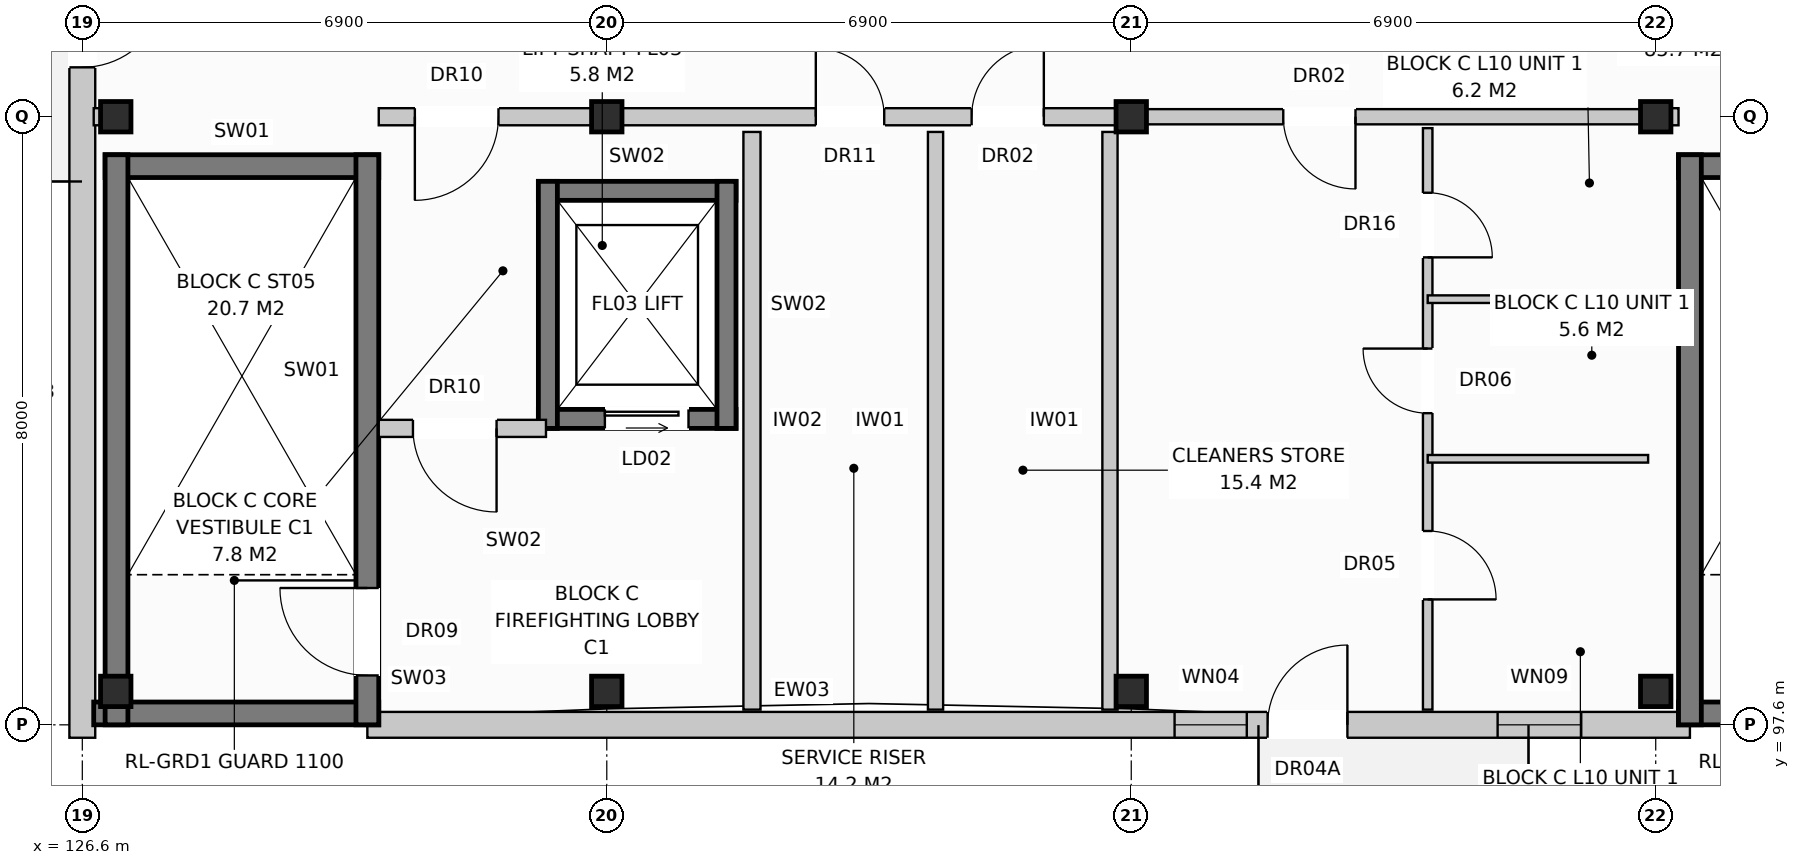
"""IFC4 building model, lengths in metres.
Left out: names, types, materials, properties, quantities, classifications, styles, units other than length and angle.
Written with IfcOpenShell. Run it as: python <this file> out.ifc"""

import sys

from ifc_helpers import new_model, si_unit, direction, frame, frame_2d, origin, origin_with_axes, origin_2d, place, context, subcontext, project, spatial, rectangle, extrude, element, fill, save


model = new_model("IFC4")
c1 = context("Model", 3, precision=1e-05, world=origin(), true_north=direction((0.0, 1.0)))
c2 = subcontext(c1, "Body", "Model", "MODEL_VIEW")
j1 = project(units=[si_unit("LENGTHUNIT", "METRE"), si_unit("PLANEANGLEUNIT", "RADIAN")], contexts=[c1])
p1 = place(None, origin())
s1 = spatial("IfcSite", under=j1, at=p1, CompositionType="ELEMENT")
p2 = place(p1, origin())
s2 = spatial("IfcBuilding", under=s1, at=p2, CompositionType="ELEMENT")
p3 = place(p2, frame((0.0, 0.0, 33.6)))
s3 = spatial("IfcBuildingStorey", under=s2, at=p3, CompositionType="ELEMENT", Elevation=33.6)
for number, where, z_axis, x_axis in (
    (1, (127.04, 98.04, 0.0), (0.0, 0.0, 1.0), (1.0, 0.0, 0.0)),
    (2, (127.04, 105.6, 0.0), (0.0, 0.0, 1.0), (1.0, 0.0, 0.0)),
    (3, (133.5, 98.04, 0.0), (0.0, 0.0, 1.0), (1.0, 0.0, 0.0)),
    (4, (133.5, 105.6, 0.0), (0.0, 0.0, 1.0), (1.0, 0.0, 0.0)),
    (5, (140.4, 98.04, 0.0), (0.0, 0.0, 1.0), (1.0, 0.0, 0.0)),
    (6, (140.4, 105.6, 0.0), (0.0, 0.0, 1.0), (1.0, 0.0, 0.0)),
    (7, (147.3, 98.04, 0.0), (0.0, 0.0, 1.0), (1.0, 0.0, 0.0)),
    (8, (147.3, 105.6, 0.0), (0.0, 0.0, 1.0), (1.0, 0.0, 0.0)),
):
    element("IfcColumn", number, at=place(p3, frame(where, z_axis=z_axis, x_axis=x_axis)), inside=s3, PredefinedType="COLUMN", context=c2, shape_type="SweptSolid", body=[
        extrude(rectangle(XDim=0.4, YDim=0.4, at=origin_2d()), origin(), (0.0, 0.0, 1.0), 3.2),
    ])
p4 = place(p3, frame((130.35, 97.6, 0.0), z_axis=(0.0, 0.0, 1.0), x_axis=(1.0, 0.0, 0.0)))
e9 = element("IfcWall", 9, at=p4, inside=s3, PredefinedType="STANDARD", context=c2, shape_type="SweptSolid", body=[
    extrude(rectangle(XDim=17.4, YDim=0.34, at=frame_2d((8.7, 0.0))), origin(), (0.0, 0.0, 1.0), 2.91),
])
p5 = place(p4, frame((11.844, 0.0, 0.0)))
e10 = element("IfcOpeningElement", 10, at=p5, cuts=e9, PredefinedType="OPENING", context=c2, shape_type="SweptSolid", body=[
    extrude(rectangle(XDim=1.05, YDim=2.12, at=frame_2d((0.525, 1.06))), frame((0.0, 0.182, 0.0), z_axis=(0.0, -1.0, 0.0), x_axis=(1.0, 0.0, 0.0)), (0.0, 0.0, 1.0), 0.364),
])
p6 = place(p4, frame((10.62, 0.0, 0.9)))
e11 = element("IfcOpeningElement", 11, at=p6, cuts=e9, PredefinedType="OPENING", context=c2, shape_type="SweptSolid", body=[
    extrude(rectangle(XDim=0.95, YDim=1.55, at=frame_2d((0.475, 0.775))), frame((0.0, 0.182, 0.0), z_axis=(0.0, -1.0, 0.0), x_axis=(1.0, 0.0, 0.0)), (0.0, 0.0, 1.0), 0.364),
])
p7 = place(p4, frame((14.87, 0.0, 0.72)))
e12 = element("IfcOpeningElement", 12, at=p7, cuts=e9, PredefinedType="OPENING", context=c2, shape_type="SweptSolid", body=[
    extrude(rectangle(XDim=1.1, YDim=1.5, at=frame_2d((0.55, 0.75))), frame((0.0, 0.182, 0.0), z_axis=(0.0, -1.0, 0.0), x_axis=(1.0, 0.0, 0.0)), (0.0, 0.0, 1.0), 0.364),
])
p8 = place(p3, frame((126.6, 97.43, 0.0), z_axis=(0.0, 0.0, 1.0), x_axis=(0.0, 1.0, 0.0)))
e13 = element("IfcWall", 13, at=p8, inside=s3, PredefinedType="STANDARD", context=c2, shape_type="SweptSolid", body=[
    extrude(rectangle(XDim=18.74, YDim=0.34, at=frame_2d((9.37, 0.0))), origin(), (0.0, 0.0, 1.0), 2.91),
])
p9 = place(p8, frame((8.82, 0.0, 0.0)))
e14 = element("IfcOpeningElement", 14, at=p9, cuts=e13, PredefinedType="OPENING", context=c2, shape_type="SweptSolid", body=[
    extrude(rectangle(XDim=1.1, YDim=2.1, at=frame_2d((0.55, 1.05))), frame((0.0, 0.182, 0.0), z_axis=(0.0, -1.0, 0.0), x_axis=(1.0, 0.0, 0.0)), (0.0, 0.0, 1.0), 0.364),
])
p10 = place(p8, frame((15.92, 0.0, 0.72)))
e15 = element("IfcOpeningElement", 15, at=p10, cuts=e13, PredefinedType="OPENING", context=c2, shape_type="SweptSolid", body=[
    extrude(rectangle(XDim=1.1, YDim=1.5, at=frame_2d((0.55, 0.75))), frame((0.0, 0.182, 0.0), z_axis=(0.0, -1.0, 0.0), x_axis=(1.0, 0.0, 0.0)), (0.0, 0.0, 1.0), 0.364),
])
p11 = place(p3, frame((126.75, 97.75, 0.0), z_axis=(0.0, 0.0, 1.0), x_axis=(1.0, 0.0, 0.0)))
e16 = element("IfcWall", 16, at=p11, inside=s3, PredefinedType="SHEAR", context=c2, shape_type="SweptSolid", body=[
    extrude(rectangle(XDim=3.75, YDim=0.3, at=frame_2d((1.875, 0.0))), origin(), (0.0, 0.0, 1.0), 2.96),
])
p12 = place(p3, frame((126.9, 104.95, 0.0), z_axis=(0.0, 0.0, 1.0), x_axis=(1.0, 0.0, 0.0)))
e17 = element("IfcWall", 17, at=p12, inside=s3, PredefinedType="SHEAR", context=c2, shape_type="SweptSolid", body=[
    extrude(rectangle(XDim=3.6, YDim=0.3, at=frame_2d((1.8, 0.0))), origin(), (0.0, 0.0, 1.0), 2.96),
])
p13 = place(p3, frame((127.05, 97.6, 0.0), z_axis=(0.0, 0.0, 1.0), x_axis=(0.0, 1.0, 0.0)))
e18 = element("IfcWall", 18, at=p13, inside=s3, PredefinedType="SHEAR", context=c2, shape_type="SweptSolid", body=[
    extrude(rectangle(XDim=7.5, YDim=0.3, at=frame_2d((3.75, 0.0))), origin(), (0.0, 0.0, 1.0), 2.96),
])
p14 = place(p3, frame((130.35, 97.6, 0.0), z_axis=(0.0, 0.0, 1.0), x_axis=(0.0, 1.0, 0.0)))
e19 = element("IfcWall", 19, at=p14, inside=s3, PredefinedType="SHEAR", context=c2, shape_type="SweptSolid", body=[
    extrude(rectangle(XDim=7.5, YDim=0.3, at=frame_2d((3.75, 0.0))), origin(), (0.0, 0.0, 1.0), 2.96),
])
p15 = place(p14, frame((0.65, 0.0, 0.0)))
e20 = element("IfcOpeningElement", 20, at=p15, cuts=e19, PredefinedType="OPENING", context=c2, shape_type="SweptSolid", body=[
    extrude(rectangle(XDim=1.15, YDim=2.15, at=frame_2d((0.575, 1.075))), frame((0.0, 0.162, 0.0), z_axis=(0.0, -1.0, 0.0), x_axis=(1.0, 0.0, 0.0)), (0.0, 0.0, 1.0), 0.324),
])
p16 = place(p3, frame((132.6, 101.625, 0.0), z_axis=(0.0, 0.0, 1.0), x_axis=(1.0, 0.0, 0.0)))
e21 = element("IfcWall", 21, at=p16, inside=s3, PredefinedType="SHEAR", context=c2, shape_type="SweptSolid", body=[
    extrude(rectangle(XDim=2.6, YDim=0.25, at=frame_2d((1.3, 0.0))), origin(), (0.0, 0.0, 1.0), 2.96),
])
p17 = place(p16, frame((0.875, 0.0, 0.0)))
e22 = element("IfcOpeningElement", 22, at=p17, cuts=e21, PredefinedType="OPENING", context=c2, shape_type="SweptSolid", body=[
    extrude(rectangle(XDim=1.1, YDim=2.1, at=frame_2d((0.55, 1.05))), frame((0.0, 0.137, 0.0), z_axis=(0.0, -1.0, 0.0), x_axis=(1.0, 0.0, 0.0)), (0.0, 0.0, 1.0), 0.274),
])
p18 = place(p3, frame((132.6, 104.625, 0.0), z_axis=(0.0, 0.0, 1.0), x_axis=(1.0, 0.0, 0.0)))
e23 = element("IfcWall", 23, at=p18, inside=s3, PredefinedType="SHEAR", context=c2, shape_type="SweptSolid", body=[
    extrude(rectangle(XDim=2.6, YDim=0.25, at=frame_2d((1.3, 0.0))), origin(), (0.0, 0.0, 1.0), 2.96),
])
for number, where, z_axis, x_axis in (
    (24, (132.725, 101.5, 0.0), (0.0, 0.0, 1.0), (0.0, 1.0, 0.0)),
    (25, (135.075, 101.5, 0.0), (0.0, 0.0, 1.0), (0.0, 1.0, 0.0)),
):
    element("IfcWall", number, at=place(p3, frame(where, z_axis=z_axis, x_axis=x_axis)), inside=s3, PredefinedType="SHEAR", context=c2, shape_type="SweptSolid", body=[
        extrude(rectangle(XDim=3.25, YDim=0.25, at=frame_2d((1.625, 0.0))), origin(), (0.0, 0.0, 1.0), 2.96),
    ])
p19 = place(p3, frame((135.41, 97.8, 0.0), z_axis=(0.0, 0.0, 1.0), x_axis=(0.0, 1.0, 0.0)))
e26 = element("IfcWall", 26, at=p19, inside=s3, PredefinedType="PARTITIONING", context=c2, shape_type="SweptSolid", body=[
    extrude(rectangle(XDim=7.6, YDim=0.225, at=frame_2d((3.8, 0.0))), origin(), (0.0, 0.0, 1.0), 2.59),
])
p20 = place(p3, frame((130.5, 101.5, 0.0), z_axis=(0.0, 0.0, 1.0), x_axis=(1.0, 0.0, 0.0)))
e27 = element("IfcWall", 27, at=p20, inside=s3, PredefinedType="PARTITIONING", context=c2, shape_type="SweptSolid", body=[
    extrude(rectangle(XDim=2.2, YDim=0.225, at=frame_2d((1.1, 0.0))), origin(), (0.0, 0.0, 1.0), 2.96),
])
p21 = place(p20, frame((0.45, 0.0, 0.0)))
e28 = element("IfcOpeningElement", 28, at=p21, cuts=e27, PredefinedType="OPENING", context=c2, shape_type="SweptSolid", body=[
    extrude(rectangle(XDim=1.1, YDim=2.15, at=frame_2d((0.55, 1.075))), frame((0.0, 0.125, 0.0), z_axis=(0.0, -1.0, 0.0), x_axis=(1.0, 0.0, 0.0)), (0.0, 0.0, 1.0), 0.249),
])
p22 = place(p3, frame((126.75, 105.6, 0.0), z_axis=(0.0, 0.0, 1.0), x_axis=(1.0, 0.0, 0.0)))
e29 = element("IfcWall", 29, at=p22, inside=s3, PredefinedType="PARTITIONING", context=c2, shape_type="SweptSolid", body=[
    extrude(rectangle(XDim=0.15, YDim=0.225, at=frame_2d((0.075, 0.0))), origin(), (0.0, 0.0, 1.0), 2.96),
])
for number, where, z_axis, x_axis in (
    (30, (137.825, 97.8, 0.0), (0.0, 0.0, 1.0), (0.0, 1.0, 0.0)),
    (31, (140.12, 97.8, 0.0), (0.0, 0.0, 1.0), (0.0, 1.0, 0.0)),
):
    element("IfcWall", number, at=place(p3, frame(where, z_axis=z_axis, x_axis=x_axis)), inside=s3, PredefinedType="PARTITIONING", context=c2, shape_type="SweptSolid", body=[
        extrude(rectangle(XDim=7.6, YDim=0.2, at=frame_2d((3.8, 0.0))), origin(), (0.0, 0.0, 1.0), 2.96),
    ])
p23 = place(p3, frame((130.5, 105.6, 0.0), z_axis=(0.0, 0.0, 1.0), x_axis=(1.0, 0.0, 0.0)))
e32 = element("IfcWall", 32, at=p23, inside=s3, PredefinedType="PARTITIONING", context=c2, shape_type="SweptSolid", body=[
    extrude(rectangle(XDim=9.9, YDim=0.225, at=frame_2d((4.95, 0.0))), origin(), (0.0, 0.0, 1.0), 2.35),
])
p24 = place(p23, frame((0.475, 0.0, 0.0)))
e33 = element("IfcOpeningElement", 33, at=p24, cuts=e32, PredefinedType="OPENING", context=c2, shape_type="SweptSolid", body=[
    extrude(rectangle(XDim=1.1, YDim=2.15, at=frame_2d((0.55, 1.075))), frame((0.0, 0.125, 0.0), z_axis=(0.0, -1.0, 0.0), x_axis=(1.0, 0.0, 0.0)), (0.0, 0.0, 1.0), 0.249),
])
p25 = place(p23, frame((5.75, 0.0, 0.0)))
e34 = element("IfcOpeningElement", 34, at=p25, cuts=e32, PredefinedType="OPENING", context=c2, shape_type="SweptSolid", body=[
    extrude(rectangle(XDim=0.9, YDim=2.1, at=frame_2d((0.45, 1.05))), frame((0.0, 0.125, 0.0), z_axis=(0.0, -1.0, 0.0), x_axis=(1.0, 0.0, 0.0)), (0.0, 0.0, 1.0), 0.249),
])
p26 = place(p23, frame((7.8, 0.0, 0.0)))
e35 = element("IfcOpeningElement", 35, at=p26, cuts=e32, PredefinedType="OPENING", context=c2, shape_type="SweptSolid", body=[
    extrude(rectangle(XDim=0.95, YDim=2.15, at=frame_2d((0.475, 1.075))), frame((0.0, 0.125, 0.0), z_axis=(0.0, -1.0, 0.0), x_axis=(1.0, 0.0, 0.0)), (0.0, 0.0, 1.0), 0.249),
])
for number, where, z_axis, x_axis in (
    (36, (147.6, 97.75, 0.0), (0.0, 0.0, 1.0), (1.0, 0.0, 0.0)),
    (37, (147.6, 104.95, 0.0), (0.0, 0.0, 1.0), (1.0, 0.0, 0.0)),
):
    element("IfcWall", number, at=place(p3, frame(where, z_axis=z_axis, x_axis=x_axis)), inside=s3, PredefinedType="SHEAR", context=c2, shape_type="SweptSolid", body=[
        extrude(rectangle(XDim=3.6, YDim=0.3, at=frame_2d((1.8, 0.0))), origin(), (0.0, 0.0, 1.0), 2.96),
    ])
p27 = place(p3, frame((147.75, 97.6, 0.0), z_axis=(0.0, 0.0, 1.0), x_axis=(0.0, 1.0, 0.0)))
e38 = element("IfcWall", 38, at=p27, inside=s3, PredefinedType="SHEAR", context=c2, shape_type="SweptSolid", body=[
    extrude(rectangle(XDim=7.5, YDim=0.3, at=frame_2d((3.75, 0.0))), origin(), (0.0, 0.0, 1.0), 2.96),
])
p28 = place(p3, frame((147.3, 105.6, 0.0), z_axis=(0.0, 0.0, 1.0), x_axis=(1.0, 0.0, 0.0)))
e39 = element("IfcWall", 39, at=p28, inside=s3, PredefinedType="PARTITIONING", context=c2, shape_type="SweptSolid", body=[
    extrude(rectangle(XDim=0.3, YDim=0.225, at=frame_2d((0.15, 0.0))), origin(), (0.0, 0.0, 1.0), 2.96),
])
p29 = place(p3, frame((140.4, 105.6, 0.0), z_axis=(0.0, 0.0, 1.0), x_axis=(1.0, 0.0, 0.0)))
e40 = element("IfcWall", 40, at=p29, inside=s3, PredefinedType="PARTITIONING", context=c2, shape_type="SweptSolid", body=[
    extrude(rectangle(XDim=6.9, YDim=0.2, at=frame_2d((3.45, 0.0))), origin(), (0.0, 0.0, 1.0), 2.35),
])
p30 = place(p29, frame((2.0, 0.0, 0.0)))
e41 = element("IfcOpeningElement", 41, at=p30, cuts=e40, PredefinedType="OPENING", context=c2, shape_type="SweptSolid", body=[
    extrude(rectangle(XDim=0.95, YDim=2.15, at=frame_2d((0.475, 1.075))), frame((0.0, 0.112, 0.0), z_axis=(0.0, -1.0, 0.0), x_axis=(1.0, 0.0, 0.0)), (0.0, 0.0, 1.0), 0.224),
])
p31 = place(p3, frame((144.3, 105.45, 0.0), z_axis=(0.0, 0.0, 1.0), x_axis=(0.0, -1.0, 0.0)))
e42 = element("IfcWall", 42, at=p31, inside=s3, PredefinedType="PARTITIONING", context=c2, shape_type="SweptSolid", body=[
    extrude(rectangle(XDim=7.65, YDim=0.125, at=frame_2d((3.825, 0.0))), origin(), (0.0, 0.0, 1.0), 2.96),
])
p32 = place(p31, frame((0.85, 0.0, 0.0)))
e43 = element("IfcOpeningElement", 43, at=p32, cuts=e42, PredefinedType="OPENING", context=c2, shape_type="SweptSolid", body=[
    extrude(rectangle(XDim=0.85, YDim=2.1, at=frame_2d((0.425, 1.05))), frame((0.0, 0.074, 0.0), z_axis=(0.0, -1.0, 0.0), x_axis=(1.0, 0.0, 0.0)), (0.0, 0.0, 1.0), 0.149),
])
p33 = place(p31, frame((2.9, 0.0, 0.0)))
e44 = element("IfcOpeningElement", 44, at=p33, cuts=e42, PredefinedType="OPENING", context=c2, shape_type="SweptSolid", body=[
    extrude(rectangle(XDim=0.85, YDim=2.05, at=frame_2d((0.425, 1.025))), frame((0.0, 0.074, 0.0), z_axis=(0.0, -1.0, 0.0), x_axis=(1.0, 0.0, 0.0)), (0.0, 0.0, 1.0), 0.149),
])
p34 = place(p31, frame((5.3, 0.0, 0.0)))
e45 = element("IfcOpeningElement", 45, at=p34, cuts=e42, PredefinedType="OPENING", context=c2, shape_type="SweptSolid", body=[
    extrude(rectangle(XDim=0.9, YDim=2.1, at=frame_2d((0.45, 1.05))), frame((0.0, 0.074, 0.0), z_axis=(0.0, -1.0, 0.0), x_axis=(1.0, 0.0, 0.0)), (0.0, 0.0, 1.0), 0.149),
])
for number, where, z_axis, x_axis in (
    (46, (144.3, 103.2, 0.0), (0.0, 0.0, 1.0), (1.0, 0.0, 0.0)),
    (47, (144.3, 101.1, 0.0), (0.0, 0.0, 1.0), (1.0, 0.0, 0.0)),
):
    element("IfcWall", number, at=place(p3, frame(where, z_axis=z_axis, x_axis=x_axis)), inside=s3, PredefinedType="PARTITIONING", context=c2, shape_type="SweptSolid", body=[
        extrude(rectangle(XDim=2.9, YDim=0.1, at=frame_2d((1.45, 0.0))), origin(), (0.0, 0.0, 1.0), 2.96),
    ])
p35 = place(p5, origin_with_axes())
e48 = element("IfcDoor", 48, at=p35, inside=s3, OperationType="SINGLE_SWING_RIGHT", PredefinedType="DOOR", context=c2, shape_type="SweptSolid", body=[
    extrude(rectangle(XDim=1.05, YDim=2.12, at=frame_2d((0.525, 1.06))), frame((0.0, 0.025, 0.0), z_axis=(0.0, -1.0, 0.0), x_axis=(1.0, 0.0, 0.0)), (0.0, 0.0, 1.0), 0.05),
])
fill(e10, e48)
p36 = place(p6, origin_with_axes())
e49 = element("IfcWindow", 49, at=p36, inside=s3, PartitioningType="SINGLE_PANEL", PredefinedType="WINDOW", context=c2, shape_type="SweptSolid", body=[
    extrude(rectangle(XDim=0.95, YDim=1.55, at=frame_2d((0.475, 0.775))), frame((0.0, 0.03, 0.0), z_axis=(0.0, -1.0, 0.0), x_axis=(1.0, 0.0, 0.0)), (0.0, 0.0, 1.0), 0.06),
])
fill(e11, e49)
p37 = place(p7, origin_with_axes())
e50 = element("IfcWindow", 50, at=p37, inside=s3, PartitioningType="SINGLE_PANEL", PredefinedType="WINDOW", context=c2, shape_type="SweptSolid", body=[
    extrude(rectangle(XDim=1.1, YDim=1.5, at=frame_2d((0.55, 0.75))), frame((0.0, 0.03, 0.0), z_axis=(0.0, -1.0, 0.0), x_axis=(1.0, 0.0, 0.0)), (0.0, 0.0, 1.0), 0.06),
])
fill(e12, e50)
p38 = place(p9, frame((1.1, 0.0, 0.0), z_axis=(0.0, 0.0, 1.0), x_axis=(-1.0, 0.0, 0.0)))
e51 = element("IfcDoor", 51, at=p38, inside=s3, OperationType="SINGLE_SWING_RIGHT", PredefinedType="DOOR", context=c2, shape_type="SweptSolid", body=[
    extrude(rectangle(XDim=1.1, YDim=2.1, at=frame_2d((0.55, 1.05))), frame((0.0, 0.025, 0.0), z_axis=(0.0, -1.0, 0.0), x_axis=(1.0, 0.0, 0.0)), (0.0, 0.0, 1.0), 0.05),
])
fill(e14, e51)
p39 = place(p15, origin_with_axes())
e52 = element("IfcDoor", 52, at=p39, inside=s3, OperationType="SINGLE_SWING_RIGHT", PredefinedType="DOOR", context=c2, shape_type="SweptSolid", body=[
    extrude(rectangle(XDim=1.15, YDim=2.15, at=frame_2d((0.575, 1.075))), frame((0.0, 0.025, 0.0), z_axis=(0.0, -1.0, 0.0), x_axis=(1.0, 0.0, 0.0)), (0.0, 0.0, 1.0), 0.05),
])
fill(e20, e52)
p40 = place(p17, origin_with_axes())
e53 = element("IfcDoor", 53, at=p40, inside=s3, OperationType="SLIDING_TO_LEFT", PredefinedType="DOOR", context=c2, shape_type="SweptSolid", body=[
    extrude(rectangle(XDim=1.1, YDim=2.1, at=frame_2d((0.55, 1.05))), frame((0.0, 0.025, 0.0), z_axis=(0.0, -1.0, 0.0), x_axis=(1.0, 0.0, 0.0)), (0.0, 0.0, 1.0), 0.05),
])
fill(e22, e53)
p41 = place(p21, frame((1.1, 0.0, 0.0), z_axis=(0.0, 0.0, 1.0), x_axis=(-1.0, 0.0, 0.0)))
e54 = element("IfcDoor", 54, at=p41, inside=s3, OperationType="SINGLE_SWING_RIGHT", PredefinedType="DOOR", context=c2, shape_type="SweptSolid", body=[
    extrude(rectangle(XDim=1.1, YDim=2.15, at=frame_2d((0.55, 1.075))), frame((0.0, 0.025, 0.0), z_axis=(0.0, -1.0, 0.0), x_axis=(1.0, 0.0, 0.0)), (0.0, 0.0, 1.0), 0.05),
])
fill(e28, e54)
p42 = place(p24, frame((1.1, 0.0, 0.0), z_axis=(0.0, 0.0, 1.0), x_axis=(-1.0, 0.0, 0.0)))
e55 = element("IfcDoor", 55, at=p42, inside=s3, OperationType="SINGLE_SWING_LEFT", PredefinedType="DOOR", context=c2, shape_type="SweptSolid", body=[
    extrude(rectangle(XDim=1.1, YDim=2.15, at=frame_2d((0.55, 1.075))), frame((0.0, 0.025, 0.0), z_axis=(0.0, -1.0, 0.0), x_axis=(1.0, 0.0, 0.0)), (0.0, 0.0, 1.0), 0.05),
])
fill(e33, e55)
p43 = place(p25, origin_with_axes())
e56 = element("IfcDoor", 56, at=p43, inside=s3, OperationType="SINGLE_SWING_LEFT", PredefinedType="DOOR", context=c2, shape_type="SweptSolid", body=[
    extrude(rectangle(XDim=0.9, YDim=2.1, at=frame_2d((0.45, 1.05))), frame((0.0, 0.025, 0.0), z_axis=(0.0, -1.0, 0.0), x_axis=(1.0, 0.0, 0.0)), (0.0, 0.0, 1.0), 0.05),
])
fill(e34, e56)
p44 = place(p26, origin_with_axes())
e57 = element("IfcDoor", 57, at=p44, inside=s3, OperationType="SINGLE_SWING_RIGHT", PredefinedType="DOOR", context=c2, shape_type="SweptSolid", body=[
    extrude(rectangle(XDim=0.95, YDim=2.15, at=frame_2d((0.475, 1.075))), frame((0.0, 0.025, 0.0), z_axis=(0.0, -1.0, 0.0), x_axis=(1.0, 0.0, 0.0)), (0.0, 0.0, 1.0), 0.05),
])
fill(e35, e57)
p45 = place(p30, frame((0.95, 0.0, 0.0), z_axis=(0.0, 0.0, 1.0), x_axis=(-1.0, 0.0, 0.0)))
e58 = element("IfcDoor", 58, at=p45, inside=s3, OperationType="SINGLE_SWING_RIGHT", PredefinedType="DOOR", context=c2, shape_type="SweptSolid", body=[
    extrude(rectangle(XDim=0.95, YDim=2.15, at=frame_2d((0.475, 1.075))), frame((0.0, 0.025, 0.0), z_axis=(0.0, -1.0, 0.0), x_axis=(1.0, 0.0, 0.0)), (0.0, 0.0, 1.0), 0.05),
])
fill(e41, e58)
p46 = place(p32, origin_with_axes())
e59 = element("IfcDoor", 59, at=p46, inside=s3, OperationType="SINGLE_SWING_RIGHT", PredefinedType="DOOR", context=c2, shape_type="SweptSolid", body=[
    extrude(rectangle(XDim=0.85, YDim=2.1, at=frame_2d((0.425, 1.05))), frame((0.0, 0.025, 0.0), z_axis=(0.0, -1.0, 0.0), x_axis=(1.0, 0.0, 0.0)), (0.0, 0.0, 1.0), 0.05),
])
fill(e43, e59)
p47 = place(p33, frame((0.85, 0.0, 0.0), z_axis=(0.0, 0.0, 1.0), x_axis=(-1.0, 0.0, 0.0)))
e60 = element("IfcDoor", 60, at=p47, inside=s3, OperationType="SINGLE_SWING_LEFT", PredefinedType="DOOR", context=c2, shape_type="SweptSolid", body=[
    extrude(rectangle(XDim=0.85, YDim=2.05, at=frame_2d((0.425, 1.025))), frame((0.0, 0.025, 0.0), z_axis=(0.0, -1.0, 0.0), x_axis=(1.0, 0.0, 0.0)), (0.0, 0.0, 1.0), 0.05),
])
fill(e44, e60)
p48 = place(p34, origin_with_axes())
e61 = element("IfcDoor", 61, at=p48, inside=s3, OperationType="SINGLE_SWING_RIGHT", PredefinedType="DOOR", context=c2, shape_type="SweptSolid", body=[
    extrude(rectangle(XDim=0.9, YDim=2.1, at=frame_2d((0.45, 1.05))), frame((0.0, 0.025, 0.0), z_axis=(0.0, -1.0, 0.0), x_axis=(1.0, 0.0, 0.0)), (0.0, 0.0, 1.0), 0.05),
])
fill(e45, e61)
save(model, sys.argv[1])
